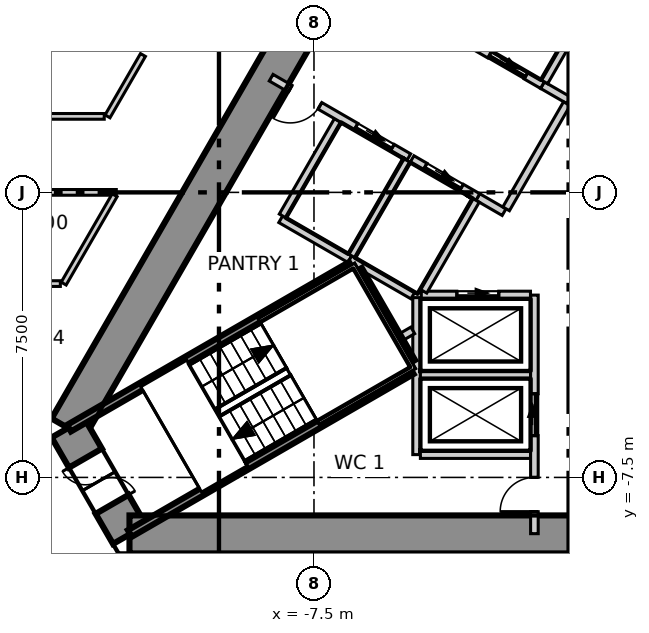
"""IFC4 building model, lengths in metres.
Left out: names, types, materials, properties, quantities, classifications, styles, units other than length and angle.
Written with IfcOpenShell. Run it as: python <this file> out.ifc"""

import sys

from ifc_helpers import new_model, si_unit, direction, frame, frame_2d, origin, place, context, subcontext, project, spatial, polyline, rectangle, outline, extrude, element, fill, save


model = new_model("IFC4")
c1 = context("Model", 3, precision=1e-05, world=origin(), true_north=direction((0.0, 1.0)))
c2 = subcontext(c1, "Body", "Model", "MODEL_VIEW")
j1 = project(units=[si_unit("LENGTHUNIT", "METRE"), si_unit("PLANEANGLEUNIT", "RADIAN")], contexts=[c1])
p1 = place(None, origin())
s1 = spatial("IfcSite", under=j1, at=p1, CompositionType="ELEMENT")
p2 = place(p1, origin())
s2 = spatial("IfcBuilding", under=s1, at=p2, CompositionType="ELEMENT")
p3 = place(p2, frame((0.0, 0.0, 30.3)))
s3 = spatial("IfcBuildingStorey", under=s2, at=p3, CompositionType="ELEMENT", Elevation=30.3)
p4 = place(p3, frame((-1.617, 15.2, -0.4), z_axis=(0.0, 0.0, 1.0), x_axis=(-0.499992141631, -0.866029940768, 0.0)))
e1 = element("IfcWall", 1, at=p4, inside=s3, PredefinedType="SHEAR", context=c2, shape_type="SweptSolid", body=[
    extrude(outline(polyline([(-0.289, -0.499), (1.656, -0.499), (3.601, -0.499), (5.547, -0.499), (7.492, -0.499), (9.437, -0.5), (11.382, -0.5), (13.328, -0.5), (15.273, -0.5), (17.218, -0.5), (19.163, -0.5), (21.109, -0.5), (23.054, -0.5), (24.999, -0.5), (24.422, 0.5), (22.566, 0.5), (20.709, 0.5), (18.853, 0.5), (16.997, 0.5), (15.14, 0.5), (13.284, 0.5), (11.427, 0.5), (9.571, 0.5), (7.715, 0.5), (5.858, 0.5), (4.002, 0.5), (2.146, 0.5), (0.289, 0.5), (-0.289, -0.499)])), origin(), (0.0, 0.0, 1.0), 5.1),
])
p5 = place(p4, frame((11.805, 0.0, 0.4)))
e2 = element("IfcOpeningElement", 2, at=p5, cuts=e1, PredefinedType="OPENING", context=c2, shape_type="SweptSolid", body=[
    extrude(rectangle(XDim=1.1, YDim=2.1, at=frame_2d((0.55, 1.05))), frame((0.0, 0.51, 0.0), z_axis=(0.0, -1.0, 0.0), x_axis=(1.0, 0.0, 0.0)), (0.0, 0.0, 1.0), 1.02),
])
p6 = place(p3, frame((-13.972, -6.2, -0.4), z_axis=(0.0, 0.0, 1.0), x_axis=(0.500077567175, -0.865980615723, 0.0)))
e3 = element("IfcWall", 3, at=p6, inside=s3, PredefinedType="SHEAR", context=c2, shape_type="SweptSolid", body=[
    extrude(outline(polyline([(-0.289, -0.5), (1.616, -0.5), (3.522, -0.5), (2.944, 0.499), (1.617, 0.5), (0.289, 0.5), (-0.289, -0.5)])), origin(), (0.0, 0.0, 1.0), 5.1),
])
p7 = place(p6, frame((0.917, 0.0, 0.4)))
e4 = element("IfcOpeningElement", 4, at=p7, cuts=e3, PredefinedType="OPENING", context=c2, shape_type="SweptSolid", body=[
    extrude(rectangle(XDim=1.4, YDim=2.1, at=frame_2d((0.7, 1.05))), frame((0.0, 0.51, 0.0), z_axis=(0.0, -1.0, 0.0), x_axis=(1.0, 0.0, 0.0)), (0.0, 0.0, 1.0), 1.02),
])
p8 = place(p3, frame((-12.355, -9.0, -0.4), z_axis=(0.0, 0.0, 1.0), x_axis=(1.0, 0.0, 0.0)))
e5 = element("IfcWall", 5, at=p8, inside=s3, PredefinedType="SHEAR", context=c2, shape_type="SweptSolid", body=[
    extrude(outline(polyline([(-0.289, -0.5), (1.656, -0.5), (3.601, -0.5), (5.547, -0.5), (7.492, -0.5), (9.437, -0.5), (11.382, -0.5), (13.328, -0.5), (15.273, -0.5), (17.218, -0.5), (19.163, -0.5), (21.109, -0.5), (23.054, -0.5), (24.999, -0.5), (24.422, 0.5), (22.566, 0.5), (20.709, 0.5), (18.853, 0.5), (16.996, 0.5), (15.14, 0.5), (13.283, 0.5), (11.427, 0.5), (9.57, 0.5), (7.714, 0.5), (5.857, 0.5), (4.001, 0.5), (2.145, 0.5), (0.288, 0.5), (-0.289, -0.5)])), origin(), (0.0, 0.0, 1.0), 5.1),
])
p9 = place(p3, frame((-22.777, 0.0, 0.0), z_axis=(0.0, 0.0, 1.0), x_axis=(1.0, 0.0, 0.0)))
e6 = element("IfcWall", 6, at=p9, inside=s3, PredefinedType="PARTITIONING", context=c2, shape_type="SweptSolid", body=[
    extrude(rectangle(XDim=10.075, YDim=0.15, at=frame_2d((5.038, 0.0))), origin(), (0.0, 0.0, 1.0), 4.7),
])
p10 = place(p3, frame((-14.087, -2.4, 0.0), z_axis=(0.0, 0.0, 1.0), x_axis=(0.499856297154, 0.866108354766, 0.0)))
e7 = element("IfcWall", 7, at=p10, inside=s3, PredefinedType="PARTITIONING", context=c2, shape_type="SweptSolid", body=[
    extrude(rectangle(XDim=2.684, YDim=0.15, at=frame_2d((1.342, 0.0))), origin(), (0.0, 0.0, 1.0), 4.7),
])
p11 = place(p3, frame((-19.333, -2.4, 0.0), z_axis=(0.0, 0.0, 1.0), x_axis=(1.0, 0.0, 0.0)))
e8 = element("IfcWall", 8, at=p11, inside=s3, PredefinedType="PARTITIONING", context=c2, shape_type="SweptSolid", body=[
    extrude(rectangle(XDim=5.159, YDim=0.15, at=frame_2d((2.58, 0.0))), origin(), (0.0, 0.0, 1.0), 4.7),
])
p12 = place(p3, frame((-12.933, 2.0, 0.0), z_axis=(0.0, 0.0, 1.0), x_axis=(0.500277597875, 0.865865073245, 0.0)))
e9 = element("IfcWall", 9, at=p12, inside=s3, PredefinedType="PARTITIONING", context=c2, shape_type="SweptSolid", body=[
    extrude(rectangle(XDim=1.865, YDim=0.15, at=frame_2d((0.933, 0.0))), origin(), (0.0, 0.0, 1.0), 4.7),
])
p13 = place(p3, frame((-19.399, 2.0, 0.0), z_axis=(0.0, 0.0, 1.0), x_axis=(1.0, 0.0, 0.0)))
e10 = element("IfcWall", 10, at=p13, inside=s3, PredefinedType="PARTITIONING", context=c2, shape_type="SweptSolid", body=[
    extrude(rectangle(XDim=6.38, YDim=0.15, at=frame_2d((3.19, 0.0))), origin(), (0.0, 0.0, 1.0), 4.7),
])
p14 = place(p3, frame((-19.356, 2.075, 0.0), z_axis=(0.0, 0.0, 1.0), x_axis=(0.500014323953, 0.866017133688, 0.0)))
e11 = element("IfcWall", 11, at=p14, inside=s3, PredefinedType="PARTITIONING", context=c2, shape_type="SweptSolid", body=[
    extrude(rectangle(XDim=10.306, YDim=0.15, at=frame_2d((5.153, 0.0))), origin(), (0.0, 0.0, 1.0), 4.7),
])
p15 = place(p14, frame((4.61, 0.0, 0.0)))
e12 = element("IfcOpeningElement", 12, at=p15, cuts=e11, PredefinedType="OPENING", context=c2, shape_type="SweptSolid", body=[
    extrude(rectangle(XDim=1.0, YDim=2.1, at=frame_2d((0.5, 1.05))), frame((0.0, 0.085, 0.0), z_axis=(0.0, -1.0, 0.0), x_axis=(1.0, 0.0, 0.0)), (0.0, 0.0, 1.0), 0.17),
])
p16 = place(p3, frame((-16.007, -9.075, 0.0), z_axis=(0.0, 0.0, 1.0), x_axis=(0.500008478926, -0.866020508419, 0.0)))
e13 = element("IfcWall", 13, at=p16, inside=s3, PredefinedType="PARTITIONING", context=c2, shape_type="SweptSolid", body=[
    extrude(rectangle(XDim=3.522, YDim=0.15, at=frame_2d((1.761, 0.0))), origin(), (0.0, 0.0, 1.0), 4.7),
])
p17 = place(p3, frame((-8.376, -0.707, 0.0), z_axis=(0.0, 0.0, 1.0), x_axis=(0.866067520717, -0.499927044236, 0.0)))
e14 = element("IfcWall", 14, at=p17, inside=s3, PredefinedType="SOLIDWALL", context=c2, shape_type="SweptSolid", body=[
    extrude(rectangle(XDim=2.1, YDim=0.2, at=frame_2d((1.05, 0.0))), origin(), (0.0, 0.0, 1.0), 4.7),
])
p18 = place(p3, frame((-8.326, -0.62, 0.0), z_axis=(0.0, 0.0, 1.0), x_axis=(0.500023687443, 0.866011727401, 0.0)))
e15 = element("IfcWall", 15, at=p18, inside=s3, PredefinedType="SOLIDWALL", context=c2, shape_type="SweptSolid", body=[
    extrude(rectangle(XDim=2.9, YDim=0.2, at=frame_2d((1.45, 0.0))), origin(), (0.0, 0.0, 1.0), 4.7),
])
p19 = place(p3, frame((-4.8, -6.9, 0.0), z_axis=(0.0, 0.0, 1.0), x_axis=(0.0, 1.0, 0.0)))
e16 = element("IfcWall", 16, at=p19, inside=s3, PredefinedType="SOLIDWALL", context=c2, shape_type="SweptSolid", body=[
    extrude(rectangle(XDim=4.131, YDim=0.2, at=frame_2d((2.065, 0.0))), origin(), (0.0, 0.0, 1.0), 4.7),
])
for number, where, z_axis, x_axis in (
    (17, (-4.7, -6.9, 0.0), (0.0, 0.0, 1.0), (1.0, 0.0, 0.0)),
    (18, (-4.7, -4.8, 0.0), (0.0, 0.0, 1.0), (1.0, 0.0, 0.0)),
):
    element("IfcWall", number, at=place(p3, frame(where, z_axis=z_axis, x_axis=x_axis)), inside=s3, PredefinedType="SOLIDWALL", context=c2, shape_type="SweptSolid", body=[
        extrude(rectangle(XDim=2.9, YDim=0.2, at=frame_2d((1.45, 0.0))), origin(), (0.0, 0.0, 1.0), 4.7),
    ])
p20 = place(p3, frame((-1.7, -8.98, 0.0), z_axis=(0.0, 0.0, 1.0), x_axis=(0.0, 1.0, 0.0)))
e19 = element("IfcWall", 19, at=p20, inside=s3, PredefinedType="SOLIDWALL", context=c2, shape_type="SweptSolid", body=[
    extrude(rectangle(XDim=6.277, YDim=0.2, at=frame_2d((3.139, 0.0))), origin(), (0.0, 0.0, 1.0), 4.7),
])
p21 = place(p20, frame((2.58, 0.0, 0.0)))
e20 = element("IfcOpeningElement", 20, at=p21, cuts=e19, PredefinedType="OPENING", context=c2, shape_type="SweptSolid", body=[
    extrude(rectangle(XDim=1.1, YDim=2.1, at=frame_2d((0.55, 1.05))), frame((0.0, 0.11, 0.0), z_axis=(0.0, -1.0, 0.0), x_axis=(1.0, 0.0, 0.0)), (0.0, 0.0, 1.0), 0.22),
])
p22 = place(p20, frame((0.58, 0.0, 0.0)))
e21 = element("IfcOpeningElement", 21, at=p22, cuts=e19, PredefinedType="OPENING", context=c2, shape_type="SweptSolid", body=[
    extrude(rectangle(XDim=0.9, YDim=2.1, at=frame_2d((0.45, 1.05))), frame((0.0, 0.11, 0.0), z_axis=(0.0, -1.0, 0.0), x_axis=(1.0, 0.0, 0.0)), (0.0, 0.0, 1.0), 0.22),
])
p23 = place(p3, frame((-4.676, -2.7, 0.0), z_axis=(0.0, 0.0, 1.0), x_axis=(1.0, 0.0, 0.0)))
e22 = element("IfcWall", 22, at=p23, inside=s3, PredefinedType="SOLIDWALL", context=c2, shape_type="SweptSolid", body=[
    extrude(rectangle(XDim=2.873, YDim=0.2, at=frame_2d((1.437, 0.0))), origin(), (0.0, 0.0, 1.0), 4.7),
])
p24 = place(p23, frame((0.937, 0.0, 0.0)))
e23 = element("IfcOpeningElement", 23, at=p24, cuts=e22, PredefinedType="OPENING", context=c2, shape_type="SweptSolid", body=[
    extrude(rectangle(XDim=1.1, YDim=2.1, at=frame_2d((0.55, 1.05))), frame((0.0, 0.11, 0.0), z_axis=(0.0, -1.0, 0.0), x_axis=(1.0, 0.0, 0.0)), (0.0, 0.0, 1.0), 0.22),
])
p25 = place(p3, frame((-8.627, 3.018, 0.0), z_axis=(0.0, 0.0, 1.0), x_axis=(0.866039775641, -0.499975106388, 0.0)))
e24 = element("IfcWall", 24, at=p25, inside=s3, PredefinedType="SOLIDWALL", context=c2, shape_type="SweptSolid", body=[
    extrude(rectangle(XDim=4.182, YDim=0.2, at=frame_2d((2.091, 0.0))), origin(), (0.0, 0.0, 1.0), 4.7),
])
p26 = place(p25, frame((2.58, 0.0, 0.0)))
e25 = element("IfcOpeningElement", 25, at=p26, cuts=e24, PredefinedType="OPENING", context=c2, shape_type="SweptSolid", body=[
    extrude(rectangle(XDim=1.1, YDim=2.1, at=frame_2d((0.55, 1.05))), frame((0.0, 0.11, 0.0), z_axis=(0.0, -1.0, 0.0), x_axis=(1.0, 0.0, 0.0)), (0.0, 0.0, 1.0), 0.22),
])
p27 = place(p25, frame((0.58, 0.0, 0.0)))
e26 = element("IfcOpeningElement", 26, at=p27, cuts=e24, PredefinedType="OPENING", context=c2, shape_type="SweptSolid", body=[
    extrude(rectangle(XDim=0.9, YDim=2.1, at=frame_2d((0.45, 1.05))), frame((0.0, 0.11, 0.0), z_axis=(0.0, -1.0, 0.0), x_axis=(1.0, 0.0, 0.0)), (0.0, 0.0, 1.0), 0.22),
])
p28 = place(p3, frame((-3.188, -0.122, 0.0), z_axis=(0.0, 0.0, 1.0), x_axis=(0.865705793592, -0.50055317294, 0.0)))
e27 = element("IfcWall", 27, at=p28, inside=s3, PredefinedType="SOLIDWALL", context=c2, shape_type="SweptSolid", body=[
    extrude(rectangle(XDim=0.797, YDim=0.2, at=frame_2d((0.398, 0.0))), origin(), (0.0, 0.0, 1.0), 4.7),
])
p29 = place(p3, frame((-1.488, 2.822, 0.0), z_axis=(0.0, 0.0, 1.0), x_axis=(0.866236612152, -0.499633997809, 0.0)))
e28 = element("IfcWall", 28, at=p29, inside=s3, PredefinedType="SOLIDWALL", context=c2, shape_type="SweptSolid", body=[
    extrude(rectangle(XDim=0.796, YDim=0.2, at=frame_2d((0.398, 0.0))), origin(), (0.0, 0.0, 1.0), 4.7),
])
p30 = place(p3, frame((-2.444, -0.433, 0.0), z_axis=(0.0, 0.0, 1.0), x_axis=(0.500035624827, 0.866004834804, 0.0)))
e29 = element("IfcWall", 29, at=p30, inside=s3, PredefinedType="SOLIDWALL", context=c2, shape_type="SweptSolid", body=[
    extrude(rectangle(XDim=3.194, YDim=0.2, at=frame_2d((1.597, 0.0))), origin(), (0.0, 0.0, 1.0), 4.7),
])
p31 = place(p3, frame((-6.557, -1.757, 0.0), z_axis=(0.0, 0.0, 1.0), x_axis=(0.8659754619, -0.500086491905, 0.0)))
e30 = element("IfcWall", 30, at=p31, inside=s3, PredefinedType="SOLIDWALL", context=c2, shape_type="SweptSolid", body=[
    extrude(rectangle(XDim=1.916, YDim=0.2, at=frame_2d((0.958, 0.0))), origin(), (0.0, 0.0, 1.0), 4.7),
])
p32 = place(p3, frame((-6.507, -1.67, 0.0), z_axis=(0.0, 0.0, 1.0), x_axis=(0.50012328804, 0.865954211699, 0.0)))
e31 = element("IfcWall", 31, at=p32, inside=s3, PredefinedType="SOLIDWALL", context=c2, shape_type="SweptSolid", body=[
    extrude(rectangle(XDim=2.9, YDim=0.2, at=frame_2d((1.45, 0.0))), origin(), (0.0, 0.0, 1.0), 4.7),
])
p33 = place(p3, frame((-4.92, 0.878, 0.0), z_axis=(0.0, 0.0, 1.0), x_axis=(0.866010750942, -0.50002537861, 0.0)))
e32 = element("IfcWall", 32, at=p33, inside=s3, PredefinedType="SOLIDWALL", context=c2, shape_type="SweptSolid", body=[
    extrude(rectangle(XDim=2.0, YDim=0.2, at=frame_2d((1.0, 0.0))), origin(), (0.0, 0.0, 1.0), 4.7),
])
p34 = place(p33, frame((0.4, 0.0, 0.0)))
e33 = element("IfcOpeningElement", 33, at=p34, cuts=e32, PredefinedType="OPENING", context=c2, shape_type="SweptSolid", body=[
    extrude(rectangle(XDim=1.1, YDim=2.1, at=frame_2d((0.55, 1.05))), frame((0.0, 0.11, 0.0), z_axis=(0.0, -1.0, 0.0), x_axis=(1.0, 0.0, 0.0)), (0.0, 0.0, 1.0), 0.22),
])
p35 = place(p3, frame((-4.619, -2.6, 0.0), z_axis=(0.0, 0.0, 1.0), x_axis=(0.50009492287, 0.865970593103, 0.0)))
e34 = element("IfcWall", 34, at=p35, inside=s3, PredefinedType="SOLIDWALL", context=c2, shape_type="SweptSolid", body=[
    extrude(rectangle(XDim=2.761, YDim=0.2, at=frame_2d((1.381, 0.0))), origin(), (0.0, 0.0, 1.0), 4.7),
])
p36 = place(p3, frame((-3.309, 3.873, 0.0), z_axis=(0.0, 0.0, 1.0), x_axis=(0.866098583652, -0.499873227325, 0.0)))
e35 = element("IfcWall", 35, at=p36, inside=s3, PredefinedType="SOLIDWALL", context=c2, shape_type="SweptSolid", body=[
    extrude(rectangle(XDim=2.103, YDim=0.2, at=frame_2d((1.051, 0.0))), origin(), (0.0, 0.0, 1.0), 4.7),
])
p37 = place(p36, frame((0.502, 0.0, 0.0)))
e36 = element("IfcOpeningElement", 36, at=p37, cuts=e35, PredefinedType="OPENING", context=c2, shape_type="SweptSolid", body=[
    extrude(rectangle(XDim=1.1, YDim=2.1, at=frame_2d((0.55, 1.05))), frame((0.0, 0.11, 0.0), z_axis=(0.0, -1.0, 0.0), x_axis=(1.0, 0.0, 0.0)), (0.0, 0.0, 1.0), 0.22),
])
p38 = place(p3, frame((-1.438, 2.909, 0.0), z_axis=(0.0, 0.0, 1.0), x_axis=(0.499829630636, 0.866123744241, 0.0)))
e37 = element("IfcWall", 37, at=p38, inside=s3, PredefinedType="SOLIDWALL", context=c2, shape_type="SweptSolid", body=[
    extrude(rectangle(XDim=2.761, YDim=0.2, at=frame_2d((1.38, 0.0))), origin(), (0.0, 0.0, 1.0), 4.7),
])
p39 = place(p3, frame((-5.195, -3.801, 0.0), z_axis=(0.0, 0.0, 1.0), x_axis=(0.86665063443, 0.498915501706, 0.0)))
e38 = element("IfcWall", 38, at=p39, inside=s3, PredefinedType="SOLIDWALL", context=c2, shape_type="SweptSolid", body=[
    extrude(rectangle(XDim=0.341, YDim=0.2, at=frame_2d((0.17, 0.0))), origin(), (0.0, 0.0, 1.0), 4.7),
])
p40 = place(p3, frame((-13.946, -6.204, 0.0), z_axis=(0.0, 0.0, 1.0), x_axis=(0.866036527536, 0.499980732602, 0.0)))
e39 = element("IfcWall", 39, at=p40, inside=s3, PredefinedType="SOLIDWALL", context=c2, shape_type="SweptSolid", body=[
    extrude(rectangle(XDim=8.564, YDim=0.2, at=frame_2d((4.282, 0.0))), origin(), (0.0, 0.0, 1.0), 4.7),
])
p41 = place(p3, frame((-6.329, -2.038, 0.0), z_axis=(0.0, 0.0, 1.0), x_axis=(0.500200581029, -0.865909567298, 0.0)))
e40 = element("IfcWall", 40, at=p41, inside=s3, PredefinedType="SOLIDWALL", context=c2, shape_type="SweptSolid", body=[
    extrude(rectangle(XDim=2.799, YDim=0.2, at=frame_2d((1.399, 0.0))), origin(), (0.0, 0.0, 1.0), 4.7),
])
p42 = place(p3, frame((-12.346, -8.976, 0.0), z_axis=(0.0, 0.0, 1.0), x_axis=(0.865987152174, 0.50006624788, 0.0)))
e41 = element("IfcWall", 41, at=p42, inside=s3, PredefinedType="SOLIDWALL", context=c2, shape_type="SweptSolid", body=[
    extrude(rectangle(XDim=8.565, YDim=0.2, at=frame_2d((4.282, 0.0))), origin(), (0.0, 0.0, 1.0), 4.7),
])
p43 = place(p24, origin())
e42 = element("IfcDoor", 42, at=p43, inside=s3, OperationType="SLIDING_TO_LEFT", PredefinedType="DOOR", context=c2, shape_type="SweptSolid", body=[
    extrude(rectangle(XDim=1.1, YDim=2.1, at=frame_2d((0.55, 1.05))), frame((0.0, 0.025, 0.0), z_axis=(0.0, -1.0, 0.0), x_axis=(1.0, 0.0, 0.0)), (0.0, 0.0, 1.0), 0.05),
])
fill(e23, e42)
p44 = place(p21, origin())
e43 = element("IfcDoor", 43, at=p44, inside=s3, OperationType="SLIDING_TO_LEFT", PredefinedType="DOOR", context=c2, shape_type="SweptSolid", body=[
    extrude(rectangle(XDim=1.1, YDim=2.1, at=frame_2d((0.55, 1.05))), frame((0.0, 0.025, 0.0), z_axis=(0.0, -1.0, 0.0), x_axis=(1.0, 0.0, 0.0)), (0.0, 0.0, 1.0), 0.05),
])
fill(e20, e43)
p45 = place(p34, origin())
e44 = element("IfcDoor", 44, at=p45, inside=s3, OperationType="SLIDING_TO_LEFT", PredefinedType="DOOR", context=c2, shape_type="SweptSolid", body=[
    extrude(rectangle(XDim=1.1, YDim=2.1, at=frame_2d((0.55, 1.05))), frame((0.0, 0.025, 0.0), z_axis=(0.0, -1.0, 0.0), x_axis=(1.0, 0.0, 0.0)), (0.0, 0.0, 1.0), 0.05),
])
fill(e33, e44)
p46 = place(p37, origin())
e45 = element("IfcDoor", 45, at=p46, inside=s3, OperationType="SLIDING_TO_LEFT", PredefinedType="DOOR", context=c2, shape_type="SweptSolid", body=[
    extrude(rectangle(XDim=1.1, YDim=2.1, at=frame_2d((0.55, 1.05))), frame((0.0, 0.025, 0.0), z_axis=(0.0, -1.0, 0.0), x_axis=(1.0, 0.0, 0.0)), (0.0, 0.0, 1.0), 0.05),
])
fill(e36, e45)
p47 = place(p26, origin())
e46 = element("IfcDoor", 46, at=p47, inside=s3, OperationType="SLIDING_TO_LEFT", PredefinedType="DOOR", context=c2, shape_type="SweptSolid", body=[
    extrude(rectangle(XDim=1.1, YDim=2.1, at=frame_2d((0.55, 1.05))), frame((0.0, 0.025, 0.0), z_axis=(0.0, -1.0, 0.0), x_axis=(1.0, 0.0, 0.0)), (0.0, 0.0, 1.0), 0.05),
])
fill(e25, e46)
p48 = place(p7, origin())
e47 = element("IfcDoor", 47, at=p48, inside=s3, OperationType="DOUBLE_DOOR_SINGLE_SWING", PredefinedType="DOOR", context=c2, shape_type="SweptSolid", body=[
    extrude(rectangle(XDim=1.4, YDim=2.1, at=frame_2d((0.7, 1.05))), frame((0.0, 0.025, 0.0), z_axis=(0.0, -1.0, 0.0), x_axis=(1.0, 0.0, 0.0)), (0.0, 0.0, 1.0), 0.05),
])
fill(e4, e47)
p49 = place(p27, origin())
e48 = element("IfcDoor", 48, at=p49, inside=s3, OperationType="SINGLE_SWING_LEFT", PredefinedType="DOOR", context=c2, shape_type="SweptSolid", body=[
    extrude(rectangle(XDim=0.9, YDim=2.1, at=frame_2d((0.45, 1.05))), frame((0.0, 0.025, 0.0), z_axis=(0.0, -1.0, 0.0), x_axis=(1.0, 0.0, 0.0)), (0.0, 0.0, 1.0), 0.05),
])
fill(e26, e48)
p50 = place(p22, origin())
e49 = element("IfcDoor", 49, at=p50, inside=s3, OperationType="SINGLE_SWING_RIGHT", PredefinedType="DOOR", context=c2, shape_type="SweptSolid", body=[
    extrude(rectangle(XDim=0.9, YDim=2.1, at=frame_2d((0.45, 1.05))), frame((0.0, 0.025, 0.0), z_axis=(0.0, -1.0, 0.0), x_axis=(1.0, 0.0, 0.0)), (0.0, 0.0, 1.0), 0.05),
])
fill(e21, e49)
save(model, sys.argv[1])
